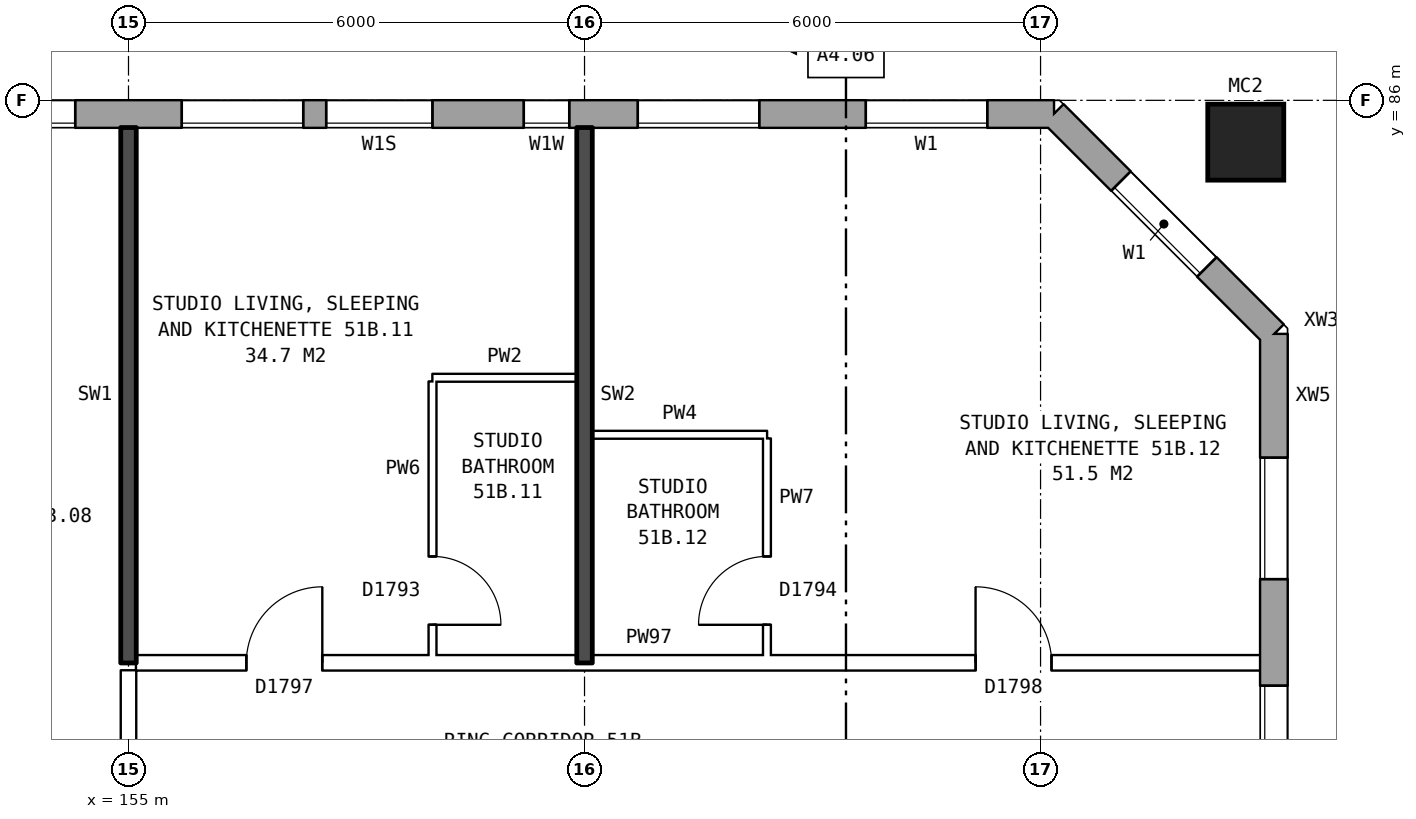
"""IFC4 building model, lengths in metres.
Left out: names, types, materials, properties, quantities, classifications, styles, units other than length and angle.
Written with IfcOpenShell. Run it as: python <this file> out.ifc"""

import sys

from ifc_helpers import new_model, si_unit, direction, frame, frame_2d, origin, origin_2d, place, context, subcontext, project, spatial, rectangle, hollow_rectangle, extrude, element, fill, save


model = new_model("IFC4")
c1 = context("Model", 3, precision=1e-05, world=origin(), true_north=direction((0.0, 1.0)))
c2 = subcontext(c1, "Body", "Model", "MODEL_VIEW")
j1 = project(units=[si_unit("LENGTHUNIT", "METRE"), si_unit("PLANEANGLEUNIT", "RADIAN")], contexts=[c1])
p1 = place(None, origin())
s1 = spatial("IfcSite", under=j1, at=p1, CompositionType="ELEMENT")
p2 = place(p1, origin())
s2 = spatial("IfcBuilding", under=s1, at=p2, CompositionType="ELEMENT")
p3 = place(p2, frame((0.0, 0.0, 182.0)))
s3 = spatial("IfcBuildingStorey", under=s2, at=p3, CompositionType="ELEMENT", Elevation=182.0)
p4 = place(p3, frame((169.7, 85.45, 0.0), z_axis=(0.0, 0.0, 1.0), x_axis=(1.0, 0.0, 0.0)))
e1 = element("IfcColumn", 1, at=p4, inside=s3, PredefinedType="COLUMN", context=c2, shape_type="SweptSolid", body=[
    extrude(hollow_rectangle(XDim=1.0, YDim=1.0, WallThickness=0.055, at=origin_2d()), origin(), (0.0, 0.0, 1.0), 3.1),
])
p5 = place(p3, frame((170.07, 57.075, 0.0), z_axis=(0.0, 0.0, 1.0), x_axis=(0.0, 1.0, 0.0)))
e2 = element("IfcWall", 2, at=p5, inside=s3, PredefinedType="STANDARD", context=c2, shape_type="SweptSolid", body=[
    extrude(rectangle(XDim=25.851, YDim=0.36, at=frame_2d((12.925, 0.0))), origin(), (0.0, 0.0, 1.0), 2.85),
])
p6 = place(p5, frame((1.625, 0.0, 0.8)))
e3 = element("IfcOpeningElement", 3, at=p6, cuts=e2, PredefinedType="OPENING", context=c2, shape_type="SweptSolid", body=[
    extrude(rectangle(XDim=1.6, YDim=1.8, at=frame_2d((0.8, 0.9))), frame((0.0, 0.19, 0.0), z_axis=(0.0, -1.0, 0.0), x_axis=(1.0, 0.0, 0.0)), (0.0, 0.0, 1.0), 0.38),
])
p7 = place(p5, frame((4.625, 0.0, 0.8)))
e4 = element("IfcOpeningElement", 4, at=p7, cuts=e2, PredefinedType="OPENING", context=c2, shape_type="SweptSolid", body=[
    extrude(rectangle(XDim=1.6, YDim=1.8, at=frame_2d((0.8, 0.9))), frame((0.0, 0.19, 0.0), z_axis=(0.0, -1.0, 0.0), x_axis=(1.0, 0.0, 0.0)), (0.0, 0.0, 1.0), 0.38),
])
p8 = place(p5, frame((7.625, 0.0, 0.8)))
e5 = element("IfcOpeningElement", 5, at=p8, cuts=e2, PredefinedType="OPENING", context=c2, shape_type="SweptSolid", body=[
    extrude(rectangle(XDim=1.6, YDim=1.8, at=frame_2d((0.8, 0.9))), frame((0.0, 0.19, 0.0), z_axis=(0.0, -1.0, 0.0), x_axis=(1.0, 0.0, 0.0)), (0.0, 0.0, 1.0), 0.38),
])
p9 = place(p5, frame((6.525, 0.0, 0.8)))
e6 = element("IfcOpeningElement", 6, at=p9, cuts=e2, PredefinedType="OPENING", context=c2, shape_type="SweptSolid", body=[
    extrude(rectangle(XDim=0.8, YDim=1.8, at=frame_2d((0.4, 0.9))), frame((0.0, 0.19, 0.0), z_axis=(0.0, -1.0, 0.0), x_axis=(1.0, 0.0, 0.0)), (0.0, 0.0, 1.0), 0.38),
])
p10 = place(p5, frame((9.525, 0.0, 0.8)))
e7 = element("IfcOpeningElement", 7, at=p10, cuts=e2, PredefinedType="OPENING", context=c2, shape_type="SweptSolid", body=[
    extrude(rectangle(XDim=1.4, YDim=1.2, at=frame_2d((0.7, 0.6))), frame((0.0, 0.19, 0.0), z_axis=(0.0, -1.0, 0.0), x_axis=(1.0, 0.0, 0.0)), (0.0, 0.0, 1.0), 0.38),
])
p11 = place(p5, frame((16.625, 0.0, 0.8)))
e8 = element("IfcOpeningElement", 8, at=p11, cuts=e2, PredefinedType="OPENING", context=c2, shape_type="SweptSolid", body=[
    extrude(rectangle(XDim=1.6, YDim=1.8, at=frame_2d((0.8, 0.9))), frame((0.0, 0.19, 0.0), z_axis=(0.0, -1.0, 0.0), x_axis=(1.0, 0.0, 0.0)), (0.0, 0.0, 1.0), 0.38),
])
p12 = place(p5, frame((19.625, 0.0, 0.8)))
e9 = element("IfcOpeningElement", 9, at=p12, cuts=e2, PredefinedType="OPENING", context=c2, shape_type="SweptSolid", body=[
    extrude(rectangle(XDim=1.6, YDim=1.8, at=frame_2d((0.8, 0.9))), frame((0.0, 0.19, 0.0), z_axis=(0.0, -1.0, 0.0), x_axis=(1.0, 0.0, 0.0)), (0.0, 0.0, 1.0), 0.38),
])
p13 = place(p5, frame((22.625, 0.0, 0.8)))
e10 = element("IfcOpeningElement", 10, at=p13, cuts=e2, PredefinedType="OPENING", context=c2, shape_type="SweptSolid", body=[
    extrude(rectangle(XDim=1.6, YDim=1.8, at=frame_2d((0.8, 0.9))), frame((0.0, 0.19, 0.0), z_axis=(0.0, -1.0, 0.0), x_axis=(1.0, 0.0, 0.0)), (0.0, 0.0, 1.0), 0.38),
])
p14 = place(p5, frame((12.275, 0.0, 0.8)))
e11 = element("IfcOpeningElement", 11, at=p14, cuts=e2, PredefinedType="OPENING", context=c2, shape_type="SweptSolid", body=[
    extrude(rectangle(XDim=1.2, YDim=1.8, at=frame_2d((0.6, 0.9))), frame((0.0, 0.19, 0.0), z_axis=(0.0, -1.0, 0.0), x_axis=(1.0, 0.0, 0.0)), (0.0, 0.0, 1.0), 0.38),
])
p15 = place(p5, frame((14.425, 0.0, 0.8)))
e12 = element("IfcOpeningElement", 12, at=p15, cuts=e2, PredefinedType="OPENING", context=c2, shape_type="SweptSolid", body=[
    extrude(rectangle(XDim=1.2, YDim=0.9, at=frame_2d((0.6, 0.45))), frame((0.0, 0.19, 0.0), z_axis=(0.0, -1.0, 0.0), x_axis=(1.0, 0.0, 0.0)), (0.0, 0.0, 1.0), 0.38),
])
p16 = place(p5, frame((18.525, 0.0, 0.8)))
e13 = element("IfcOpeningElement", 13, at=p16, cuts=e2, PredefinedType="OPENING", context=c2, shape_type="SweptSolid", body=[
    extrude(rectangle(XDim=0.6, YDim=1.8, at=frame_2d((0.3, 0.9))), frame((0.0, 0.19, 0.0), z_axis=(0.0, -1.0, 0.0), x_axis=(1.0, 0.0, 0.0)), (0.0, 0.0, 1.0), 0.38),
])
p17 = place(p3, frame((170.07, 82.925, 0.0), z_axis=(0.0, 0.0, 1.0), x_axis=(-0.707106781187, 0.707106781187, 0.0)))
e14 = element("IfcWall", 14, at=p17, inside=s3, PredefinedType="STANDARD", context=c2, shape_type="SweptSolid", body=[
    extrude(rectangle(XDim=4.094, YDim=0.36, at=frame_2d((2.047, 0.0))), origin(), (0.0, 0.0, 1.0), 2.85),
])
p18 = place(p17, frame((1.247, 0.0, 0.8)))
e15 = element("IfcOpeningElement", 15, at=p18, cuts=e14, PredefinedType="OPENING", context=c2, shape_type="SweptSolid", body=[
    extrude(rectangle(XDim=1.6, YDim=1.8, at=frame_2d((0.8, 0.9))), frame((0.0, 0.19, 0.0), z_axis=(0.0, -1.0, 0.0), x_axis=(1.0, 0.0, 0.0)), (0.0, 0.0, 1.0), 0.38),
])
p19 = place(p3, frame((167.175, 85.82, 0.0), z_axis=(0.0, 0.0, 1.0), x_axis=(-1.0, 0.0, 0.0)))
e16 = element("IfcWall", 16, at=p19, inside=s3, PredefinedType="STANDARD", context=c2, shape_type="SweptSolid", body=[
    extrude(rectangle(XDim=33.101, YDim=0.36, at=frame_2d((16.55, 0.0))), origin(), (0.0, 0.0, 1.0), 2.85),
])
p20 = place(p19, frame((0.875, 0.0, 0.8)))
e17 = element("IfcOpeningElement", 17, at=p20, cuts=e16, PredefinedType="OPENING", context=c2, shape_type="SweptSolid", body=[
    extrude(rectangle(XDim=1.6, YDim=1.8, at=frame_2d((0.8, 0.9))), frame((0.0, 0.19, 0.0), z_axis=(0.0, -1.0, 0.0), x_axis=(1.0, 0.0, 0.0)), (0.0, 0.0, 1.0), 0.38),
])
p21 = place(p19, frame((3.875, 0.0, 0.8)))
e18 = element("IfcOpeningElement", 18, at=p21, cuts=e16, PredefinedType="OPENING", context=c2, shape_type="SweptSolid", body=[
    extrude(rectangle(XDim=1.6, YDim=1.8, at=frame_2d((0.8, 0.9))), frame((0.0, 0.19, 0.0), z_axis=(0.0, -1.0, 0.0), x_axis=(1.0, 0.0, 0.0)), (0.0, 0.0, 1.0), 0.38),
])
p22 = place(p19, frame((6.375, 0.0, 1.5)))
e19 = element("IfcOpeningElement", 19, at=p22, cuts=e16, PredefinedType="OPENING", context=c2, shape_type="SweptSolid", body=[
    extrude(rectangle(XDim=0.6, YDim=0.9, at=frame_2d((0.3, 0.45))), frame((0.0, 0.19, 0.0), z_axis=(0.0, -1.0, 0.0), x_axis=(1.0, 0.0, 0.0)), (0.0, 0.0, 1.0), 0.38),
])
p23 = place(p19, frame((9.875, 0.0, 0.8)))
e20 = element("IfcOpeningElement", 20, at=p23, cuts=e16, PredefinedType="OPENING", context=c2, shape_type="SweptSolid", body=[
    extrude(rectangle(XDim=1.6, YDim=1.8, at=frame_2d((0.8, 0.9))), frame((0.0, 0.19, 0.0), z_axis=(0.0, -1.0, 0.0), x_axis=(1.0, 0.0, 0.0)), (0.0, 0.0, 1.0), 0.38),
])
p24 = place(p19, frame((12.875, 0.0, 0.8)))
e21 = element("IfcOpeningElement", 21, at=p24, cuts=e16, PredefinedType="OPENING", context=c2, shape_type="SweptSolid", body=[
    extrude(rectangle(XDim=1.6, YDim=1.8, at=frame_2d((0.8, 0.9))), frame((0.0, 0.19, 0.0), z_axis=(0.0, -1.0, 0.0), x_axis=(1.0, 0.0, 0.0)), (0.0, 0.0, 1.0), 0.38),
])
p25 = place(p19, frame((15.875, 0.0, 0.8)))
e22 = element("IfcOpeningElement", 22, at=p25, cuts=e16, PredefinedType="OPENING", context=c2, shape_type="SweptSolid", body=[
    extrude(rectangle(XDim=1.6, YDim=1.8, at=frame_2d((0.8, 0.9))), frame((0.0, 0.19, 0.0), z_axis=(0.0, -1.0, 0.0), x_axis=(1.0, 0.0, 0.0)), (0.0, 0.0, 1.0), 0.38),
])
p26 = place(p19, frame((18.875, 0.0, 0.8)))
e23 = element("IfcOpeningElement", 23, at=p26, cuts=e16, PredefinedType="OPENING", context=c2, shape_type="SweptSolid", body=[
    extrude(rectangle(XDim=1.6, YDim=1.8, at=frame_2d((0.8, 0.9))), frame((0.0, 0.19, 0.0), z_axis=(0.0, -1.0, 0.0), x_axis=(1.0, 0.0, 0.0)), (0.0, 0.0, 1.0), 0.38),
])
p27 = place(p19, frame((21.875, 0.0, 0.8)))
e24 = element("IfcOpeningElement", 24, at=p27, cuts=e16, PredefinedType="OPENING", context=c2, shape_type="SweptSolid", body=[
    extrude(rectangle(XDim=1.6, YDim=1.8, at=frame_2d((0.8, 0.9))), frame((0.0, 0.19, 0.0), z_axis=(0.0, -1.0, 0.0), x_axis=(1.0, 0.0, 0.0)), (0.0, 0.0, 1.0), 0.38),
])
p28 = place(p19, frame((25.975, 0.0, 1.7)))
e25 = element("IfcOpeningElement", 25, at=p28, cuts=e16, PredefinedType="OPENING", context=c2, shape_type="SweptSolid", body=[
    extrude(rectangle(XDim=0.6, YDim=0.9, at=frame_2d((0.3, 0.45))), frame((0.0, 0.19, 0.0), z_axis=(0.0, -1.0, 0.0), x_axis=(1.0, 0.0, 0.0)), (0.0, 0.0, 1.0), 0.38),
])
p29 = place(p19, frame((27.875, 0.0, 0.8)))
e26 = element("IfcOpeningElement", 26, at=p29, cuts=e16, PredefinedType="OPENING", context=c2, shape_type="SweptSolid", body=[
    extrude(rectangle(XDim=1.6, YDim=1.8, at=frame_2d((0.8, 0.9))), frame((0.0, 0.19, 0.0), z_axis=(0.0, -1.0, 0.0), x_axis=(1.0, 0.0, 0.0)), (0.0, 0.0, 1.0), 0.38),
])
p30 = place(p19, frame((30.875, 0.0, 0.8)))
e27 = element("IfcOpeningElement", 27, at=p30, cuts=e16, PredefinedType="OPENING", context=c2, shape_type="SweptSolid", body=[
    extrude(rectangle(XDim=1.6, YDim=1.8, at=frame_2d((0.8, 0.9))), frame((0.0, 0.19, 0.0), z_axis=(0.0, -1.0, 0.0), x_axis=(1.0, 0.0, 0.0)), (0.0, 0.0, 1.0), 0.38),
])
p31 = place(p19, frame((8.175, 0.0, 0.8)))
e28 = element("IfcOpeningElement", 28, at=p31, cuts=e16, PredefinedType="OPENING", context=c2, shape_type="SweptSolid", body=[
    extrude(rectangle(XDim=1.4, YDim=0.9, at=frame_2d((0.7, 0.45))), frame((0.0, 0.19, 0.0), z_axis=(0.0, -1.0, 0.0), x_axis=(1.0, 0.0, 0.0)), (0.0, 0.0, 1.0), 0.38),
])
p32 = place(p19, frame((26.875, 0.0, 0.8)))
e29 = element("IfcOpeningElement", 29, at=p32, cuts=e16, PredefinedType="OPENING", context=c2, shape_type="SweptSolid", body=[
    extrude(rectangle(XDim=0.6, YDim=1.8, at=frame_2d((0.3, 0.9))), frame((0.0, 0.19, 0.0), z_axis=(0.0, -1.0, 0.0), x_axis=(1.0, 0.0, 0.0)), (0.0, 0.0, 1.0), 0.38),
])
p33 = place(p3, frame((155.1, 78.6, 0.0), z_axis=(0.0, 0.0, 1.0), x_axis=(1.0, 0.0, 0.0)))
e30 = element("IfcWall", 30, at=p33, inside=s3, PredefinedType="PARTITIONING", context=c2, shape_type="SweptSolid", body=[
    extrude(rectangle(XDim=14.79, YDim=0.2, at=frame_2d((7.395, 0.0))), origin(), (0.0, 0.0, 1.0), 2.85),
])
p34 = place(p33, frame((1.45, 0.0, 0.0)))
e31 = element("IfcOpeningElement", 31, at=p34, cuts=e30, PredefinedType="OPENING", context=c2, shape_type="SweptSolid", body=[
    extrude(rectangle(XDim=1.0, YDim=2.1, at=frame_2d((0.5, 1.05))), frame((0.0, 0.11, 0.0), z_axis=(0.0, -1.0, 0.0), x_axis=(1.0, 0.0, 0.0)), (0.0, 0.0, 1.0), 0.22),
])
p35 = place(p33, frame((11.045, 0.0, 0.0)))
e32 = element("IfcOpeningElement", 32, at=p35, cuts=e30, PredefinedType="OPENING", context=c2, shape_type="SweptSolid", body=[
    extrude(rectangle(XDim=1.0, YDim=2.1, at=frame_2d((0.5, 1.05))), frame((0.0, 0.11, 0.0), z_axis=(0.0, -1.0, 0.0), x_axis=(1.0, 0.0, 0.0)), (0.0, 0.0, 1.0), 0.22),
])
p36 = place(p3, frame((161.1, 81.6, 0.0), z_axis=(0.0, 0.0, 1.0), x_axis=(1.0, 0.0, 0.0)))
e33 = element("IfcWall", 33, at=p36, inside=s3, PredefinedType="PARTITIONING", context=c2, shape_type="SweptSolid", body=[
    extrude(rectangle(XDim=2.3, YDim=0.1, at=frame_2d((1.15, 0.0))), origin(), (0.0, 0.0, 1.0), 2.85),
])
p37 = place(p3, frame((159.0, 82.35, 0.0), z_axis=(0.0, 0.0, 1.0), x_axis=(1.0, 0.0, 0.0)))
e34 = element("IfcWall", 34, at=p37, inside=s3, PredefinedType="PARTITIONING", context=c2, shape_type="SweptSolid", body=[
    extrude(rectangle(XDim=1.9, YDim=0.1, at=frame_2d((0.95, 0.0))), origin(), (0.0, 0.0, 1.0), 2.85),
])
p38 = place(p3, frame((155.0, 76.3, 0.0), z_axis=(0.0, 0.0, 1.0), x_axis=(0.0, 1.0, 0.0)))
e35 = element("IfcWall", 35, at=p38, inside=s3, PredefinedType="PARTITIONING", context=c2, shape_type="SweptSolid", body=[
    extrude(rectangle(XDim=2.2, YDim=0.2, at=frame_2d((1.1, 0.0))), origin(), (0.0, 0.0, 1.0), 2.85),
])
p39 = place(p3, frame((155.0, 78.6, 0.0), z_axis=(0.0, 0.0, 1.0), x_axis=(0.0, 1.0, 0.0)))
e36 = element("IfcWall", 36, at=p39, inside=s3, PredefinedType="SOLIDWALL", context=c2, shape_type="SweptSolid", body=[
    extrude(rectangle(XDim=7.04, YDim=0.2, at=frame_2d((3.52, 0.0))), origin(), (0.0, 0.0, 1.0), 2.85),
])
p40 = place(p3, frame((159.0, 78.7, 0.0), z_axis=(0.0, 0.0, 1.0), x_axis=(0.0, 1.0, 0.0)))
e37 = element("IfcWall", 37, at=p40, inside=s3, PredefinedType="PARTITIONING", context=c2, shape_type="SweptSolid", body=[
    extrude(rectangle(XDim=3.6, YDim=0.1, at=frame_2d((1.8, 0.0))), origin(), (0.0, 0.0, 1.0), 2.85),
])
p41 = place(p40, frame((0.4, 0.0, 0.0)))
e38 = element("IfcOpeningElement", 38, at=p41, cuts=e37, PredefinedType="OPENING", context=c2, shape_type="SweptSolid", body=[
    extrude(rectangle(XDim=0.9, YDim=2.1, at=frame_2d((0.45, 1.05))), frame((0.0, 0.06, 0.0), z_axis=(0.0, -1.0, 0.0), x_axis=(1.0, 0.0, 0.0)), (0.0, 0.0, 1.0), 0.12),
])
p42 = place(p3, frame((161.0, 78.6, 0.0), z_axis=(0.0, 0.0, 1.0), x_axis=(0.0, 1.0, 0.0)))
e39 = element("IfcWall", 39, at=p42, inside=s3, PredefinedType="SOLIDWALL", context=c2, shape_type="SweptSolid", body=[
    extrude(rectangle(XDim=7.04, YDim=0.2, at=frame_2d((3.52, 0.0))), origin(), (0.0, 0.0, 1.0), 2.85),
])
p43 = place(p3, frame((163.4, 78.7, 0.0), z_axis=(0.0, 0.0, 1.0), x_axis=(0.0, 1.0, 0.0)))
e40 = element("IfcWall", 40, at=p43, inside=s3, PredefinedType="PARTITIONING", context=c2, shape_type="SweptSolid", body=[
    extrude(rectangle(XDim=2.85, YDim=0.1, at=frame_2d((1.425, 0.0))), origin(), (0.0, 0.0, 1.0), 2.85),
])
p44 = place(p43, frame((0.4, 0.0, 0.0)))
e41 = element("IfcOpeningElement", 41, at=p44, cuts=e40, PredefinedType="OPENING", context=c2, shape_type="SweptSolid", body=[
    extrude(rectangle(XDim=0.9, YDim=2.1, at=frame_2d((0.45, 1.05))), frame((0.0, 0.06, 0.0), z_axis=(0.0, -1.0, 0.0), x_axis=(1.0, 0.0, 0.0)), (0.0, 0.0, 1.0), 0.12),
])
p45 = place(p12, origin())
e42 = element("IfcWindow", 42, at=p45, inside=s3, PartitioningType="SINGLE_PANEL", PredefinedType="WINDOW", context=c2, shape_type="SweptSolid", body=[
    extrude(rectangle(XDim=1.6, YDim=1.8, at=frame_2d((0.8, 0.9))), frame((0.0, 0.15, 0.0), z_axis=(0.0, -1.0, 0.0), x_axis=(1.0, 0.0, 0.0)), (0.0, 0.0, 1.0), 0.06),
])
fill(e9, e42)
p46 = place(p13, origin())
e43 = element("IfcWindow", 43, at=p46, inside=s3, PartitioningType="SINGLE_PANEL", PredefinedType="WINDOW", context=c2, shape_type="SweptSolid", body=[
    extrude(rectangle(XDim=1.6, YDim=1.8, at=frame_2d((0.8, 0.9))), frame((0.0, 0.15, 0.0), z_axis=(0.0, -1.0, 0.0), x_axis=(1.0, 0.0, 0.0)), (0.0, 0.0, 1.0), 0.06),
])
fill(e10, e43)
p47 = place(p18, origin())
e44 = element("IfcWindow", 44, at=p47, inside=s3, PartitioningType="SINGLE_PANEL", PredefinedType="WINDOW", context=c2, shape_type="SweptSolid", body=[
    extrude(rectangle(XDim=1.6, YDim=1.8, at=frame_2d((0.8, 0.9))), frame((0.0, 0.15, 0.0), z_axis=(0.0, -1.0, 0.0), x_axis=(1.0, 0.0, 0.0)), (0.0, 0.0, 1.0), 0.06),
])
fill(e15, e44)
p48 = place(p20, origin())
e45 = element("IfcWindow", 45, at=p48, inside=s3, PartitioningType="SINGLE_PANEL", PredefinedType="WINDOW", context=c2, shape_type="SweptSolid", body=[
    extrude(rectangle(XDim=1.6, YDim=1.8, at=frame_2d((0.8, 0.9))), frame((0.0, 0.15, 0.0), z_axis=(0.0, -1.0, 0.0), x_axis=(1.0, 0.0, 0.0)), (0.0, 0.0, 1.0), 0.06),
])
fill(e17, e45)
p49 = place(p21, origin())
e46 = element("IfcWindow", 46, at=p49, inside=s3, PartitioningType="SINGLE_PANEL", PredefinedType="WINDOW", context=c2, shape_type="SweptSolid", body=[
    extrude(rectangle(XDim=1.6, YDim=1.8, at=frame_2d((0.8, 0.9))), frame((0.0, 0.15, 0.0), z_axis=(0.0, -1.0, 0.0), x_axis=(1.0, 0.0, 0.0)), (0.0, 0.0, 1.0), 0.06),
])
fill(e18, e46)
p50 = place(p22, origin())
e47 = element("IfcWindow", 47, at=p50, inside=s3, PartitioningType="SINGLE_PANEL", PredefinedType="WINDOW", context=c2, shape_type="SweptSolid", body=[
    extrude(rectangle(XDim=0.6, YDim=0.9, at=frame_2d((0.3, 0.45))), frame((0.0, 0.15, 0.0), z_axis=(0.0, -1.0, 0.0), x_axis=(1.0, 0.0, 0.0)), (0.0, 0.0, 1.0), 0.06),
])
fill(e19, e47)
p51 = place(p23, origin())
e48 = element("IfcWindow", 48, at=p51, inside=s3, PartitioningType="SINGLE_PANEL", PredefinedType="WINDOW", context=c2, shape_type="SweptSolid", body=[
    extrude(rectangle(XDim=1.6, YDim=1.8, at=frame_2d((0.8, 0.9))), frame((0.0, 0.15, 0.0), z_axis=(0.0, -1.0, 0.0), x_axis=(1.0, 0.0, 0.0)), (0.0, 0.0, 1.0), 0.06),
])
fill(e20, e48)
p52 = place(p24, origin())
e49 = element("IfcWindow", 49, at=p52, inside=s3, PartitioningType="SINGLE_PANEL", PredefinedType="WINDOW", context=c2, shape_type="SweptSolid", body=[
    extrude(rectangle(XDim=1.6, YDim=1.8, at=frame_2d((0.8, 0.9))), frame((0.0, 0.15, 0.0), z_axis=(0.0, -1.0, 0.0), x_axis=(1.0, 0.0, 0.0)), (0.0, 0.0, 1.0), 0.06),
])
fill(e21, e49)
p53 = place(p34, origin())
e50 = element("IfcDoor", 50, at=p53, inside=s3, OperationType="SINGLE_SWING_RIGHT", PredefinedType="DOOR", context=c2, shape_type="SweptSolid", body=[
    extrude(rectangle(XDim=1.0, YDim=2.1, at=frame_2d((0.5, 1.05))), frame((0.0, 0.025, 0.0), z_axis=(0.0, -1.0, 0.0), x_axis=(1.0, 0.0, 0.0)), (0.0, 0.0, 1.0), 0.05),
])
fill(e31, e50)
p54 = place(p41, frame((0.9, 0.0, 0.0), z_axis=(0.0, 0.0, 1.0), x_axis=(-1.0, 0.0, 0.0)))
e51 = element("IfcDoor", 51, at=p54, inside=s3, OperationType="SINGLE_SWING_RIGHT", PredefinedType="DOOR", context=c2, shape_type="SweptSolid", body=[
    extrude(rectangle(XDim=0.9, YDim=2.1, at=frame_2d((0.45, 1.05))), frame((0.0, 0.025, 0.0), z_axis=(0.0, -1.0, 0.0), x_axis=(1.0, 0.0, 0.0)), (0.0, 0.0, 1.0), 0.05),
])
fill(e38, e51)
p55 = place(p35, origin())
e52 = element("IfcDoor", 52, at=p55, inside=s3, OperationType="SINGLE_SWING_LEFT", PredefinedType="DOOR", context=c2, shape_type="SweptSolid", body=[
    extrude(rectangle(XDim=1.0, YDim=2.1, at=frame_2d((0.5, 1.05))), frame((0.0, 0.025, 0.0), z_axis=(0.0, -1.0, 0.0), x_axis=(1.0, 0.0, 0.0)), (0.0, 0.0, 1.0), 0.05),
])
fill(e32, e52)
p56 = place(p44, origin())
e53 = element("IfcDoor", 53, at=p56, inside=s3, OperationType="SINGLE_SWING_LEFT", PredefinedType="DOOR", context=c2, shape_type="SweptSolid", body=[
    extrude(rectangle(XDim=0.9, YDim=2.1, at=frame_2d((0.45, 1.05))), frame((0.0, 0.025, 0.0), z_axis=(0.0, -1.0, 0.0), x_axis=(1.0, 0.0, 0.0)), (0.0, 0.0, 1.0), 0.05),
])
fill(e41, e53)
p57 = place(p31, origin())
e54 = element("IfcWindow", 54, at=p57, inside=s3, PartitioningType="SINGLE_PANEL", PredefinedType="WINDOW", context=c2, shape_type="SweptSolid", body=[
    extrude(rectangle(XDim=1.4, YDim=0.9, at=frame_2d((0.7, 0.45))), frame((0.0, 0.15, 0.0), z_axis=(0.0, -1.0, 0.0), x_axis=(1.0, 0.0, 0.0)), (0.0, 0.0, 1.0), 0.06),
])
fill(e28, e54)
save(model, sys.argv[1])
